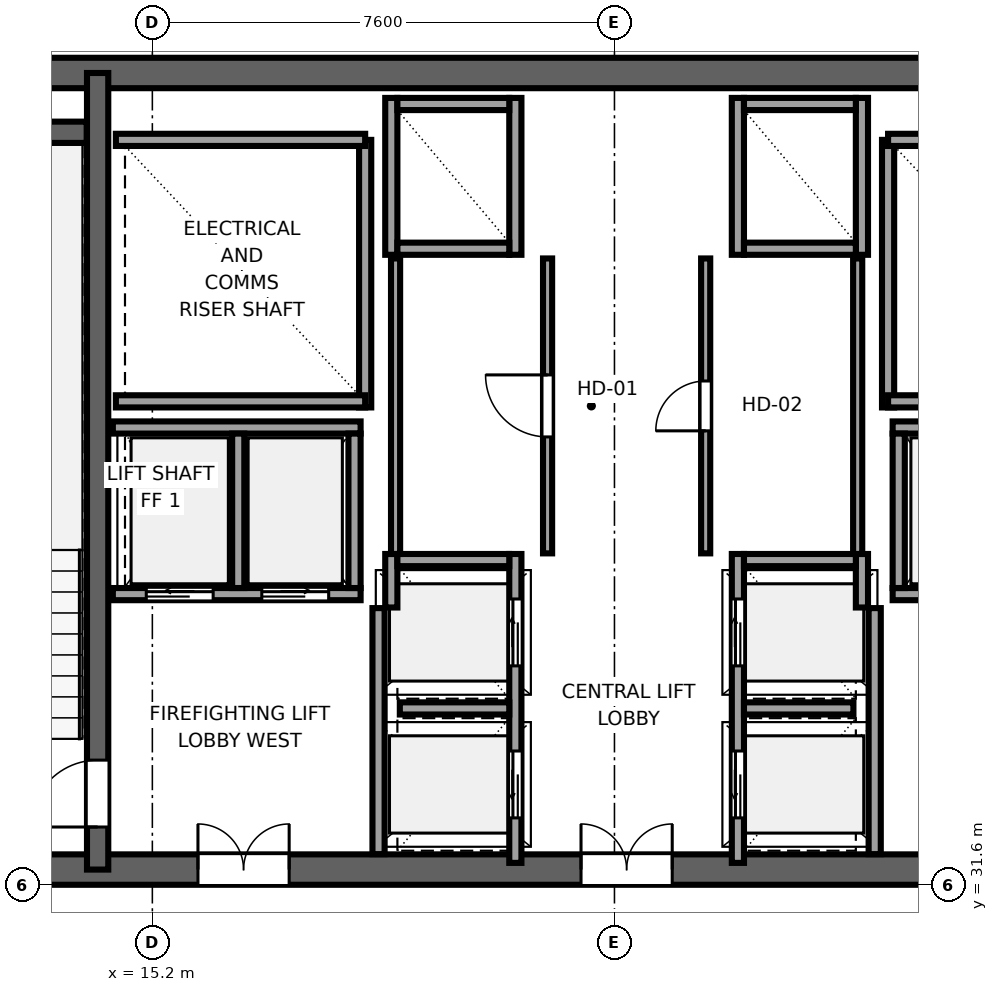
"""IFC4 building model, lengths in metres.
Left out: names, types, materials, properties, quantities, classifications, styles, units other than length and angle.
Written with IfcOpenShell. Run it as: python <this file> out.ifc"""

import sys

from ifc_helpers import new_model, si_unit, direction, frame, frame_2d, origin, place, context, subcontext, project, spatial, rectangle, extrude, source, transform, mapped, element, fill, save


model = new_model("IFC4")
c1 = context("Model", 3, precision=1e-05, world=origin(), true_north=direction((0.0, 1.0)))
c2 = subcontext(c1, "Body", "Model", "MODEL_VIEW")
j1 = project(units=[si_unit("LENGTHUNIT", "METRE"), si_unit("PLANEANGLEUNIT", "RADIAN")], contexts=[c1])
p1 = place(None, origin())
s1 = spatial("IfcSite", under=j1, at=p1, CompositionType="ELEMENT")
p2 = place(p1, origin())
s2 = spatial("IfcBuilding", under=s1, at=p2, CompositionType="ELEMENT")
p3 = place(p2, frame((0.0, 0.0, 227.45)))
s3 = spatial("IfcBuildingStorey", under=s2, at=p3, CompositionType="ELEMENT", Elevation=227.45)
p4 = place(p3, frame((10.0, 31.85, 0.0), z_axis=(0.0, 0.0, 1.0), x_axis=(1.0, 0.0, 0.0)))
e1 = element("IfcWall", 1, at=p4, inside=s3, PredefinedType="SHEAR", context=c2, shape_type="SweptSolid", body=[
    extrude(rectangle(XDim=26.0, YDim=0.5, at=frame_2d((13.0, 0.0))), origin(), (0.0, 0.0, 1.0), 3.55),
])
p5 = place(p4, frame((7.45, 0.0, 0.0), z_axis=(0.0, 0.0, 1.0), x_axis=(-1.0, 0.0, 0.0)))
e2 = element("IfcOpeningElement", 2, at=p5, cuts=e1, PredefinedType="OPENING", context=c2, shape_type="SweptSolid", body=[
    extrude(rectangle(XDim=1.5, YDim=2.04, at=frame_2d((0.75, 1.02))), frame((0.0, 0.26, 0.0), z_axis=(0.0, -1.0, 0.0), x_axis=(1.0, 0.0, 0.0)), (0.0, 0.0, 1.0), 0.52),
])
p6 = place(p4, frame((13.75, 0.0, 0.0), z_axis=(0.0, 0.0, 1.0), x_axis=(-1.0, 0.0, 0.0)))
e3 = element("IfcOpeningElement", 3, at=p6, cuts=e1, PredefinedType="OPENING", context=c2, shape_type="SweptSolid", body=[
    extrude(rectangle(XDim=1.5, YDim=2.04, at=frame_2d((0.75, 1.02))), frame((0.0, 0.26, 0.0), z_axis=(0.0, -1.0, 0.0), x_axis=(1.0, 0.0, 0.0)), (0.0, 0.0, 1.0), 0.52),
])
p7 = place(p4, frame((20.05, 0.0, 0.0), z_axis=(0.0, 0.0, 1.0), x_axis=(-1.0, 0.0, 0.0)))
e4 = element("IfcOpeningElement", 4, at=p7, cuts=e1, PredefinedType="OPENING", context=c2, shape_type="SweptSolid", body=[
    extrude(rectangle(XDim=1.5, YDim=2.04, at=frame_2d((0.75, 1.02))), frame((0.0, 0.26, 0.0), z_axis=(0.0, -1.0, 0.0), x_axis=(1.0, 0.0, 0.0)), (0.0, 0.0, 1.0), 0.52),
])
p8 = place(p3, frame((10.0, 44.95, 0.0), z_axis=(0.0, 0.0, 1.0), x_axis=(1.0, 0.0, 0.0)))
e5 = element("IfcWall", 5, at=p8, inside=s3, PredefinedType="SHEAR", context=c2, shape_type="SweptSolid", body=[
    extrude(rectangle(XDim=26.0, YDim=0.5, at=frame_2d((13.0, 0.0))), origin(), (0.0, 0.0, 1.0), 3.55),
])
p9 = place(p3, frame((14.3, 31.85, 0.0), z_axis=(0.0, 0.0, 1.0), x_axis=(0.0, 1.0, 0.0)))
e6 = element("IfcWall", 6, at=p9, inside=s3, PredefinedType="SHEAR", context=c2, shape_type="SweptSolid", body=[
    extrude(rectangle(XDim=13.1, YDim=0.35, at=frame_2d((6.55, 0.0))), origin(), (0.0, 0.0, 1.0), 3.55),
])
p10 = place(p9, frame((0.7, 0.0, 0.0)))
e7 = element("IfcOpeningElement", 7, at=p10, cuts=e6, PredefinedType="OPENING", context=c2, shape_type="SweptSolid", body=[
    extrude(rectangle(XDim=1.1, YDim=2.12, at=frame_2d((0.55, 1.06))), frame((0.0, 0.185, 0.0), z_axis=(0.0, -1.0, 0.0), x_axis=(1.0, 0.0, 0.0)), (0.0, 0.0, 1.0), 0.37),
])
p11 = place(p3, frame((10.52, 43.975, 0.0), z_axis=(0.0, 0.0, 1.0), x_axis=(1.0, 0.0, 0.0)))
e8 = element("IfcWall", 8, at=p11, inside=s3, PredefinedType="SHEAR", context=c2, shape_type="SweptSolid", body=[
    extrude(rectangle(XDim=3.6, YDim=0.35, at=frame_2d((1.8, 0.0))), origin(), (0.0, 0.0, 1.0), 3.55),
])
p12 = place(p3, frame((18.7, 39.45, 0.0), z_axis=(0.0, 0.0, 1.0), x_axis=(0.0, 1.0, 0.0)))
e9 = element("IfcWall", 9, at=p12, inside=s3, PredefinedType="SOLIDWALL", context=c2, shape_type="SweptSolid", body=[
    extrude(rectangle(XDim=4.4, YDim=0.2, at=frame_2d((2.2, 0.0))), origin(), (0.0, 0.0, 1.0), 3.37),
])
for number, where, z_axis, x_axis in (
    (10, (14.6, 39.55, 0.0), (0.0, 0.0, 1.0), (1.0, 0.0, 0.0)),
    (11, (14.6, 43.85, 0.0), (0.0, 0.0, 1.0), (1.0, 0.0, 0.0)),
):
    element("IfcWall", number, at=place(p3, frame(where, z_axis=z_axis, x_axis=x_axis)), inside=s3, PredefinedType="SOLIDWALL", context=c2, shape_type="SweptSolid", body=[
        extrude(rectangle(XDim=4.1, YDim=0.2, at=frame_2d((2.05, 0.0))), origin(), (0.0, 0.0, 1.0), 3.37),
    ])
p13 = place(p3, frame((27.3, 39.45, 0.0), z_axis=(0.0, 0.0, 1.0), x_axis=(0.0, 1.0, 0.0)))
e12 = element("IfcWall", 12, at=p13, inside=s3, PredefinedType="SOLIDWALL", context=c2, shape_type="SweptSolid", body=[
    extrude(rectangle(XDim=4.4, YDim=0.2, at=frame_2d((2.2, 0.0))), origin(), (0.0, 0.0, 1.0), 3.37),
])
for number, where, z_axis, x_axis in (
    (13, (27.3, 39.55, 0.0), (0.0, 0.0, 1.0), (1.0, 0.0, 0.0)),
    (14, (27.3, 43.85, 0.0), (0.0, 0.0, 1.0), (1.0, 0.0, 0.0)),
):
    element("IfcWall", number, at=place(p3, frame(where, z_axis=z_axis, x_axis=x_axis)), inside=s3, PredefinedType="SOLIDWALL", context=c2, shape_type="SweptSolid", body=[
        extrude(rectangle(XDim=4.1, YDim=0.2, at=frame_2d((2.05, 0.0))), origin(), (0.0, 0.0, 1.0), 3.37),
    ])
for number, where, z_axis, x_axis in (
    (15, (18.92, 32.104, 0.0), (0.0, 0.0, 1.0), (0.0, 1.0, 0.0)),
    (16, (27.08, 32.104, 0.0), (0.0, 0.0, 1.0), (0.0, 1.0, 0.0)),
):
    element("IfcWall", number, at=place(p3, frame(where, z_axis=z_axis, x_axis=x_axis)), inside=s3, PredefinedType="SOLIDWALL", context=c2, shape_type="SweptSolid", body=[
        extrude(rectangle(XDim=4.046, YDim=0.2, at=frame_2d((2.023, 0.0))), origin(), (0.0, 0.0, 1.0), 3.37),
    ])
p14 = place(p3, frame((21.17, 31.96, 0.0), z_axis=(0.0, 0.0, 1.0), x_axis=(0.0, 1.0, 0.0)))
e17 = element("IfcWall", 17, at=p14, inside=s3, PredefinedType="SOLIDWALL", context=c2, shape_type="SweptSolid", body=[
    extrude(rectangle(XDim=5.08, YDim=0.2, at=frame_2d((2.54, 0.0))), origin(), (0.0, 0.0, 1.0), 3.37),
])
p15 = place(p14, frame((0.74, 0.0, 0.0)))
e18 = element("IfcOpeningElement", 18, at=p15, cuts=e17, PredefinedType="OPENING", context=c2, shape_type="SweptSolid", body=[
    extrude(rectangle(XDim=1.1, YDim=2.12, at=frame_2d((0.55, 1.06))), frame((0.0, 0.11, 0.0), z_axis=(0.0, -1.0, 0.0), x_axis=(1.0, 0.0, 0.0)), (0.0, 0.0, 1.0), 0.22),
])
p16 = place(p14, frame((3.24, 0.0, 0.0)))
e19 = element("IfcOpeningElement", 19, at=p16, cuts=e17, PredefinedType="OPENING", context=c2, shape_type="SweptSolid", body=[
    extrude(rectangle(XDim=1.1, YDim=2.12, at=frame_2d((0.55, 1.06))), frame((0.0, 0.11, 0.0), z_axis=(0.0, -1.0, 0.0), x_axis=(1.0, 0.0, 0.0)), (0.0, 0.0, 1.0), 0.22),
])
p17 = place(p3, frame((19.13, 36.16, 0.0), z_axis=(0.0, 0.0, 1.0), x_axis=(0.0, 1.0, 0.0)))
e20 = element("IfcWall", 20, at=p17, inside=s3, PredefinedType="SOLIDWALL", context=c2, shape_type="SweptSolid", body=[
    extrude(rectangle(XDim=0.88, YDim=0.2, at=frame_2d((0.44, 0.0))), origin(), (0.0, 0.0, 1.0), 3.37),
])
p18 = place(p3, frame((19.23, 36.94, 0.0), z_axis=(0.0, 0.0, 1.0), x_axis=(1.0, 0.0, 0.0)))
e21 = element("IfcWall", 21, at=p18, inside=s3, PredefinedType="SOLIDWALL", context=c2, shape_type="SweptSolid", body=[
    extrude(rectangle(XDim=1.84, YDim=0.2, at=frame_2d((0.92, 0.0))), origin(), (0.0, 0.0, 1.0), 3.37),
])
p19 = place(p3, frame((19.27, 34.5, 0.0), z_axis=(0.0, 0.0, 1.0), x_axis=(1.0, 0.0, 0.0)))
e22 = element("IfcWall", 22, at=p19, inside=s3, PredefinedType="SOLIDWALL", context=c2, shape_type="SweptSolid", body=[
    extrude(rectangle(XDim=1.8, YDim=0.2, at=frame_2d((0.9, 0.0))), origin(), (0.0, 0.0, 1.0), 3.37),
])
for number, where, z_axis, x_axis in (
    (23, (21.17, 41.96, 0.0), (0.0, 0.0, 1.0), (0.0, 1.0, 0.0)),
    (24, (19.13, 41.96, 0.0), (0.0, 0.0, 1.0), (0.0, 1.0, 0.0)),
):
    element("IfcWall", number, at=place(p3, frame(where, z_axis=z_axis, x_axis=x_axis)), inside=s3, PredefinedType="SOLIDWALL", context=c2, shape_type="SweptSolid", body=[
        extrude(rectangle(XDim=2.58, YDim=0.2, at=frame_2d((1.29, 0.0))), origin(), (0.0, 0.0, 1.0), 3.37),
    ])
for number, where, z_axis, x_axis in (
    (25, (19.23, 42.06, 0.0), (0.0, 0.0, 1.0), (1.0, 0.0, 0.0)),
    (26, (19.23, 44.44, 0.0), (0.0, 0.0, 1.0), (1.0, 0.0, 0.0)),
):
    element("IfcWall", number, at=place(p3, frame(where, z_axis=z_axis, x_axis=x_axis)), inside=s3, PredefinedType="SOLIDWALL", context=c2, shape_type="SweptSolid", body=[
        extrude(rectangle(XDim=1.84, YDim=0.2, at=frame_2d((0.92, 0.0))), origin(), (0.0, 0.0, 1.0), 3.37),
    ])
p20 = place(p3, frame((27.375, 36.38, 0.0), z_axis=(0.0, 0.0, 1.0), x_axis=(1.0, 0.0, 0.0)))
e27 = element("IfcWall", 27, at=p20, inside=s3, PredefinedType="SOLIDWALL", context=c2, shape_type="SweptSolid", body=[
    extrude(rectangle(XDim=4.075, YDim=0.2, at=frame_2d((2.038, 0.0))), origin(), (0.0, 0.0, 1.0), 3.37),
])
p21 = place(p20, frame((0.525, 0.0, 0.0)))
e28 = element("IfcOpeningElement", 28, at=p21, cuts=e27, PredefinedType="OPENING", context=c2, shape_type="SweptSolid", body=[
    extrude(rectangle(XDim=1.1, YDim=2.12, at=frame_2d((0.55, 1.06))), frame((0.0, 0.11, 0.0), z_axis=(0.0, -1.0, 0.0), x_axis=(1.0, 0.0, 0.0)), (0.0, 0.0, 1.0), 0.22),
])
p22 = place(p20, frame((2.425, 0.0, 0.0)))
e29 = element("IfcOpeningElement", 29, at=p22, cuts=e27, PredefinedType="OPENING", context=c2, shape_type="SweptSolid", body=[
    extrude(rectangle(XDim=1.1, YDim=2.12, at=frame_2d((0.55, 1.06))), frame((0.0, 0.11, 0.0), z_axis=(0.0, -1.0, 0.0), x_axis=(1.0, 0.0, 0.0)), (0.0, 0.0, 1.0), 0.22),
])
p23 = place(p3, frame((27.375, 39.12, 0.0), z_axis=(0.0, 0.0, 1.0), x_axis=(1.0, 0.0, 0.0)))
e30 = element("IfcWall", 30, at=p23, inside=s3, PredefinedType="SOLIDWALL", context=c2, shape_type="SweptSolid", body=[
    extrude(rectangle(XDim=4.075, YDim=0.2, at=frame_2d((2.038, 0.0))), origin(), (0.0, 0.0, 1.0), 3.37),
])
p24 = place(p3, frame((27.475, 36.48, 0.0), z_axis=(0.0, 0.0, 1.0), x_axis=(0.0, 1.0, 0.0)))
e31 = element("IfcWall", 31, at=p24, inside=s3, PredefinedType="SOLIDWALL", context=c2, shape_type="SweptSolid", body=[
    extrude(rectangle(XDim=2.54, YDim=0.2, at=frame_2d((1.27, 0.0))), origin(), (0.0, 0.0, 1.0), 3.37),
])
p25 = place(p3, frame((14.55, 36.38, 0.0), z_axis=(0.0, 0.0, 1.0), x_axis=(1.0, 0.0, 0.0)))
e32 = element("IfcWall", 32, at=p25, inside=s3, PredefinedType="SOLIDWALL", context=c2, shape_type="SweptSolid", body=[
    extrude(rectangle(XDim=4.075, YDim=0.2, at=frame_2d((2.038, 0.0))), origin(), (0.0, 0.0, 1.0), 3.37),
])
p26 = place(p25, frame((0.55, 0.0, 0.0)))
e33 = element("IfcOpeningElement", 33, at=p26, cuts=e32, PredefinedType="OPENING", context=c2, shape_type="SweptSolid", body=[
    extrude(rectangle(XDim=1.1, YDim=2.12, at=frame_2d((0.55, 1.06))), frame((0.0, 0.11, 0.0), z_axis=(0.0, -1.0, 0.0), x_axis=(1.0, 0.0, 0.0)), (0.0, 0.0, 1.0), 0.22),
])
p27 = place(p25, frame((2.45, 0.0, 0.0)))
e34 = element("IfcOpeningElement", 34, at=p27, cuts=e32, PredefinedType="OPENING", context=c2, shape_type="SweptSolid", body=[
    extrude(rectangle(XDim=1.1, YDim=2.12, at=frame_2d((0.55, 1.06))), frame((0.0, 0.11, 0.0), z_axis=(0.0, -1.0, 0.0), x_axis=(1.0, 0.0, 0.0)), (0.0, 0.0, 1.0), 0.22),
])
p28 = place(p3, frame((14.55, 39.12, 0.0), z_axis=(0.0, 0.0, 1.0), x_axis=(1.0, 0.0, 0.0)))
e35 = element("IfcWall", 35, at=p28, inside=s3, PredefinedType="SOLIDWALL", context=c2, shape_type="SweptSolid", body=[
    extrude(rectangle(XDim=4.075, YDim=0.2, at=frame_2d((2.038, 0.0))), origin(), (0.0, 0.0, 1.0), 3.37),
])
for number, where, z_axis, x_axis in (
    (36, (18.525, 36.48, 0.0), (0.0, 0.0, 1.0), (0.0, 1.0, 0.0)),
    (37, (16.613, 36.48, 0.0), (0.0, 0.0, 1.0), (0.0, 1.0, 0.0)),
):
    element("IfcWall", number, at=place(p3, frame(where, z_axis=z_axis, x_axis=x_axis)), inside=s3, PredefinedType="SOLIDWALL", context=c2, shape_type="SweptSolid", body=[
        extrude(rectangle(XDim=2.54, YDim=0.2, at=frame_2d((1.27, 0.0))), origin(), (0.0, 0.0, 1.0), 3.37),
    ])
p29 = place(p3, frame((24.83, 31.96, 0.0), z_axis=(0.0, 0.0, 1.0), x_axis=(0.0, 1.0, 0.0)))
e38 = element("IfcWall", 38, at=p29, inside=s3, PredefinedType="SOLIDWALL", context=c2, shape_type="SweptSolid", body=[
    extrude(rectangle(XDim=5.08, YDim=0.2, at=frame_2d((2.54, 0.0))), origin(), (0.0, 0.0, 1.0), 3.37),
])
p30 = place(p29, frame((0.74, 0.0, 0.0)))
e39 = element("IfcOpeningElement", 39, at=p30, cuts=e38, PredefinedType="OPENING", context=c2, shape_type="SweptSolid", body=[
    extrude(rectangle(XDim=1.1, YDim=2.12, at=frame_2d((0.55, 1.06))), frame((0.0, 0.11, 0.0), z_axis=(0.0, -1.0, 0.0), x_axis=(1.0, 0.0, 0.0)), (0.0, 0.0, 1.0), 0.22),
])
p31 = place(p29, frame((3.24, 0.0, 0.0)))
e40 = element("IfcOpeningElement", 40, at=p31, cuts=e38, PredefinedType="OPENING", context=c2, shape_type="SweptSolid", body=[
    extrude(rectangle(XDim=1.1, YDim=2.12, at=frame_2d((0.55, 1.06))), frame((0.0, 0.11, 0.0), z_axis=(0.0, -1.0, 0.0), x_axis=(1.0, 0.0, 0.0)), (0.0, 0.0, 1.0), 0.22),
])
p32 = place(p3, frame((26.87, 36.16, 0.0), z_axis=(0.0, 0.0, 1.0), x_axis=(0.0, 1.0, 0.0)))
e41 = element("IfcWall", 41, at=p32, inside=s3, PredefinedType="SOLIDWALL", context=c2, shape_type="SweptSolid", body=[
    extrude(rectangle(XDim=0.88, YDim=0.2, at=frame_2d((0.44, 0.0))), origin(), (0.0, 0.0, 1.0), 3.37),
])
p33 = place(p3, frame((24.93, 36.94, 0.0), z_axis=(0.0, 0.0, 1.0), x_axis=(1.0, 0.0, 0.0)))
e42 = element("IfcWall", 42, at=p33, inside=s3, PredefinedType="SOLIDWALL", context=c2, shape_type="SweptSolid", body=[
    extrude(rectangle(XDim=1.84, YDim=0.2, at=frame_2d((0.92, 0.0))), origin(), (0.0, 0.0, 1.0), 3.37),
])
p34 = place(p3, frame((24.93, 34.5, 0.0), z_axis=(0.0, 0.0, 1.0), x_axis=(1.0, 0.0, 0.0)))
e43 = element("IfcWall", 43, at=p34, inside=s3, PredefinedType="SOLIDWALL", context=c2, shape_type="SweptSolid", body=[
    extrude(rectangle(XDim=1.8, YDim=0.2, at=frame_2d((0.9, 0.0))), origin(), (0.0, 0.0, 1.0), 3.37),
])
for number, where, z_axis, x_axis in (
    (44, (24.83, 41.96, 0.0), (0.0, 0.0, 1.0), (0.0, 1.0, 0.0)),
    (45, (26.87, 41.96, 0.0), (0.0, 0.0, 1.0), (0.0, 1.0, 0.0)),
):
    element("IfcWall", number, at=place(p3, frame(where, z_axis=z_axis, x_axis=x_axis)), inside=s3, PredefinedType="SOLIDWALL", context=c2, shape_type="SweptSolid", body=[
        extrude(rectangle(XDim=2.58, YDim=0.2, at=frame_2d((1.29, 0.0))), origin(), (0.0, 0.0, 1.0), 3.37),
    ])
for number, where, z_axis, x_axis in (
    (46, (24.93, 42.06, 0.0), (0.0, 0.0, 1.0), (1.0, 0.0, 0.0)),
    (47, (24.93, 44.44, 0.0), (0.0, 0.0, 1.0), (1.0, 0.0, 0.0)),
):
    element("IfcWall", number, at=place(p3, frame(where, z_axis=z_axis, x_axis=x_axis)), inside=s3, PredefinedType="SOLIDWALL", context=c2, shape_type="SweptSolid", body=[
        extrude(rectangle(XDim=1.84, YDim=0.2, at=frame_2d((0.92, 0.0))), origin(), (0.0, 0.0, 1.0), 3.37),
    ])
p35 = place(p3, frame((21.7, 37.05, 0.0), z_axis=(0.0, 0.0, 1.0), x_axis=(0.0, 1.0, 0.0)))
e48 = element("IfcWall", 48, at=p35, inside=s3, PredefinedType="PARTITIONING", context=c2, shape_type="SweptSolid", body=[
    extrude(rectangle(XDim=4.85, YDim=0.15, at=frame_2d((2.425, 0.0))), origin(), (0.0, 0.0, 1.0), 3.37),
])
p36 = place(p35, frame((1.915, 0.0, 0.0)))
e49 = element("IfcOpeningElement", 49, at=p36, cuts=e48, PredefinedType="OPENING", context=c2, shape_type="SweptSolid", body=[
    extrude(rectangle(XDim=1.02, YDim=2.03, at=frame_2d((0.51, 1.015))), frame((0.0, 0.085, 0.0), z_axis=(0.0, -1.0, 0.0), x_axis=(1.0, 0.0, 0.0)), (0.0, 0.0, 1.0), 0.17),
])
p37 = place(p3, frame((19.2, 37.04, 0.0), z_axis=(0.0, 0.0, 1.0), x_axis=(0.0, 1.0, 0.0)))
e50 = element("IfcWall", 50, at=p37, inside=s3, PredefinedType="PARTITIONING", context=c2, shape_type="SweptSolid", body=[
    extrude(rectangle(XDim=4.86, YDim=0.15, at=frame_2d((2.43, 0.0))), origin(), (0.0, 0.0, 1.0), 3.37),
])
p38 = place(p3, frame((24.3, 37.05, 0.0), z_axis=(0.0, 0.0, 1.0), x_axis=(0.0, 1.0, 0.0)))
e51 = element("IfcWall", 51, at=p38, inside=s3, PredefinedType="PARTITIONING", context=c2, shape_type="SweptSolid", body=[
    extrude(rectangle(XDim=4.85, YDim=0.15, at=frame_2d((2.425, 0.0))), origin(), (0.0, 0.0, 1.0), 3.37),
])
p39 = place(p38, frame((2.015, 0.0, 0.0)))
e52 = element("IfcOpeningElement", 52, at=p39, cuts=e51, PredefinedType="OPENING", context=c2, shape_type="SweptSolid", body=[
    extrude(rectangle(XDim=0.82, YDim=2.01, at=frame_2d((0.41, 1.005))), frame((0.0, 0.085, 0.0), z_axis=(0.0, -1.0, 0.0), x_axis=(1.0, 0.0, 0.0)), (0.0, 0.0, 1.0), 0.17),
])
p40 = place(p3, frame((26.8, 37.04, 0.0), z_axis=(0.0, 0.0, 1.0), x_axis=(0.0, 1.0, 0.0)))
e53 = element("IfcWall", 53, at=p40, inside=s3, PredefinedType="PARTITIONING", context=c2, shape_type="SweptSolid", body=[
    extrude(rectangle(XDim=4.86, YDim=0.15, at=frame_2d((2.43, 0.0))), origin(), (0.0, 0.0, 1.0), 3.37),
])
m1 = source(origin(), c2, "Body", "SweptSolid", [
    extrude(rectangle(XDim=1.1, YDim=2.12, at=frame_2d((0.55, 1.06))), frame((0.0, 0.025, 0.0), z_axis=(0.0, -1.0, 0.0), x_axis=(1.0, 0.0, 0.0)), (0.0, 0.0, 1.0), 0.05),
])
p41 = place(p10, origin())
e54 = element("IfcDoor", 54, at=p41, inside=s3, OperationType="SINGLE_SWING_LEFT", PredefinedType="DOOR", context=c2, shape_type="MappedRepresentation", body=[
    mapped(m1, transform((0.0, 0.0, 0.0), x_axis=(1.0, 0.0, 0.0), y_axis=(0.0, 1.0, 0.0), z_axis=(0.0, 0.0, 1.0), scale=1.0)),
])
fill(e7, e54)
m2 = source(origin(), c2, "Body", "SweptSolid", [
    extrude(rectangle(XDim=1.5, YDim=2.04, at=frame_2d((0.75, 1.02))), frame((0.0, 0.025, 0.0), z_axis=(0.0, -1.0, 0.0), x_axis=(1.0, 0.0, 0.0)), (0.0, 0.0, 1.0), 0.05),
])
p42 = place(p5, origin())
e55 = element("IfcDoor", 55, at=p42, inside=s3, OperationType="DOUBLE_DOOR_SINGLE_SWING", PredefinedType="DOOR", context=c2, shape_type="MappedRepresentation", body=[
    mapped(m2, transform((0.0, 0.0, 0.0), x_axis=(1.0, 0.0, 0.0), y_axis=(0.0, 1.0, 0.0), z_axis=(0.0, 0.0, 1.0), scale=1.0)),
])
fill(e2, e55)
p43 = place(p6, origin())
e56 = element("IfcDoor", 56, at=p43, inside=s3, OperationType="DOUBLE_DOOR_SINGLE_SWING", PredefinedType="DOOR", context=c2, shape_type="MappedRepresentation", body=[
    mapped(m2, transform((0.0, 0.0, 0.0), x_axis=(1.0, 0.0, 0.0), y_axis=(0.0, 1.0, 0.0), z_axis=(0.0, 0.0, 1.0), scale=1.0)),
])
fill(e3, e56)
m3 = source(origin(), c2, "Body", "SweptSolid", [
    extrude(rectangle(XDim=1.1, YDim=2.12, at=frame_2d((0.55, 1.06))), frame((0.0, 0.025, 0.0), z_axis=(0.0, -1.0, 0.0), x_axis=(1.0, 0.0, 0.0)), (0.0, 0.0, 1.0), 0.05),
])
p44 = place(p15, origin())
e57 = element("IfcDoor", 57, at=p44, inside=s3, OperationType="SLIDING_TO_LEFT", PredefinedType="DOOR", context=c2, shape_type="MappedRepresentation", body=[
    mapped(m3, transform((0.0, 0.0, 0.0), x_axis=(1.0, 0.0, 0.0), y_axis=(0.0, 1.0, 0.0), z_axis=(0.0, 0.0, 1.0), scale=1.0)),
])
fill(e18, e57)
p45 = place(p16, origin())
e58 = element("IfcDoor", 58, at=p45, inside=s3, OperationType="SLIDING_TO_RIGHT", PredefinedType="DOOR", context=c2, shape_type="MappedRepresentation", body=[
    mapped(m3, transform((0.0, 0.0, 0.0), x_axis=(1.0, 0.0, 0.0), y_axis=(0.0, 1.0, 0.0), z_axis=(0.0, 0.0, 1.0), scale=1.0)),
])
fill(e19, e58)
p46 = place(p26, origin())
e59 = element("IfcDoor", 59, at=p46, inside=s3, OperationType="SLIDING_TO_LEFT", PredefinedType="DOOR", context=c2, shape_type="MappedRepresentation", body=[
    mapped(m3, transform((0.0, 0.0, 0.0), x_axis=(1.0, 0.0, 0.0), y_axis=(0.0, 1.0, 0.0), z_axis=(0.0, 0.0, 1.0), scale=1.0)),
])
fill(e33, e59)
p47 = place(p27, origin())
e60 = element("IfcDoor", 60, at=p47, inside=s3, OperationType="SLIDING_TO_RIGHT", PredefinedType="DOOR", context=c2, shape_type="MappedRepresentation", body=[
    mapped(m3, transform((0.0, 0.0, 0.0), x_axis=(1.0, 0.0, 0.0), y_axis=(0.0, 1.0, 0.0), z_axis=(0.0, 0.0, 1.0), scale=1.0)),
])
fill(e34, e60)
p48 = place(p30, origin())
e61 = element("IfcDoor", 61, at=p48, inside=s3, OperationType="SLIDING_TO_LEFT", PredefinedType="DOOR", context=c2, shape_type="MappedRepresentation", body=[
    mapped(m3, transform((0.0, 0.0, 0.0), x_axis=(1.0, 0.0, 0.0), y_axis=(0.0, 1.0, 0.0), z_axis=(0.0, 0.0, 1.0), scale=1.0)),
])
fill(e39, e61)
p49 = place(p31, origin())
e62 = element("IfcDoor", 62, at=p49, inside=s3, OperationType="SLIDING_TO_RIGHT", PredefinedType="DOOR", context=c2, shape_type="MappedRepresentation", body=[
    mapped(m3, transform((0.0, 0.0, 0.0), x_axis=(1.0, 0.0, 0.0), y_axis=(0.0, 1.0, 0.0), z_axis=(0.0, 0.0, 1.0), scale=1.0)),
])
fill(e40, e62)
m4 = source(origin(), c2, "Body", "SweptSolid", [
    extrude(rectangle(XDim=1.02, YDim=2.03, at=frame_2d((0.51, 1.015))), frame((0.0, 0.025, 0.0), z_axis=(0.0, -1.0, 0.0), x_axis=(1.0, 0.0, 0.0)), (0.0, 0.0, 1.0), 0.05),
])
p50 = place(p36, origin())
e63 = element("IfcDoor", 63, at=p50, inside=s3, OperationType="SINGLE_SWING_RIGHT", PredefinedType="DOOR", context=c2, shape_type="MappedRepresentation", body=[
    mapped(m4, transform((0.0, 0.0, 0.0), x_axis=(1.0, 0.0, 0.0), y_axis=(0.0, 1.0, 0.0), z_axis=(0.0, 0.0, 1.0), scale=1.0)),
])
fill(e49, e63)
m5 = source(origin(), c2, "Body", "SweptSolid", [
    extrude(rectangle(XDim=0.82, YDim=2.01, at=frame_2d((0.41, 1.005))), frame((0.0, 0.025, 0.0), z_axis=(0.0, -1.0, 0.0), x_axis=(1.0, 0.0, 0.0)), (0.0, 0.0, 1.0), 0.05),
])
p51 = place(p39, origin())
e64 = element("IfcDoor", 64, at=p51, inside=s3, OperationType="SINGLE_SWING_LEFT", PredefinedType="DOOR", context=c2, shape_type="MappedRepresentation", body=[
    mapped(m5, transform((0.0, 0.0, 0.0), x_axis=(1.0, 0.0, 0.0), y_axis=(0.0, 1.0, 0.0), z_axis=(0.0, 0.0, 1.0), scale=1.0)),
])
fill(e52, e64)
save(model, sys.argv[1])
